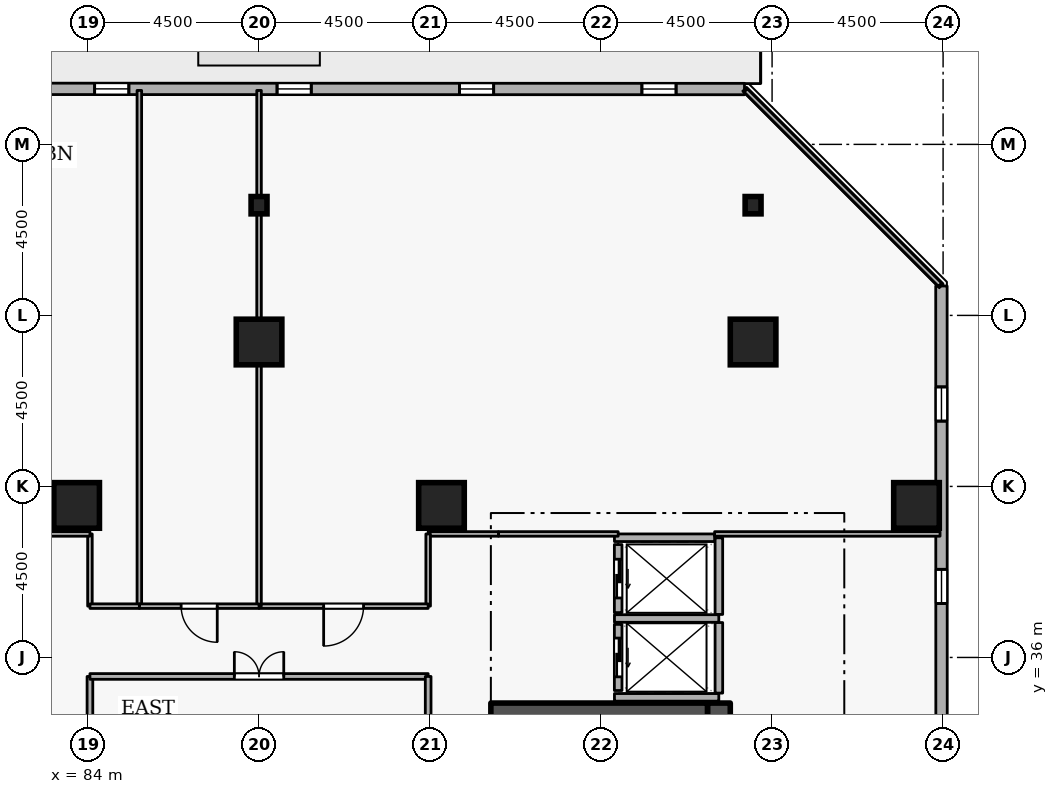
"""IFC4 building model, lengths in metres.
Left out: names, types, materials, properties, quantities, classifications, styles, units other than length and angle.
Written with IfcOpenShell. Run it as: python <this file> out.ifc"""

import sys

from ifc_helpers import new_model, si_unit, direction, frame, frame_2d, origin, origin_2d, place, context, subcontext, project, spatial, rectangle, i_section, extrude, element, fill, save


model = new_model("IFC4")
c1 = context("Model", 3, precision=1e-05, world=origin(), true_north=direction((0.0, 1.0)))
c2 = subcontext(c1, "Body", "Model", "MODEL_VIEW")
j1 = project(units=[si_unit("LENGTHUNIT", "METRE"), si_unit("PLANEANGLEUNIT", "RADIAN")], contexts=[c1])
p1 = place(None, origin())
s1 = spatial("IfcSite", under=j1, at=p1, CompositionType="ELEMENT")
p2 = place(p1, origin())
s2 = spatial("IfcBuilding", under=s1, at=p2, CompositionType="ELEMENT")
p3 = place(p2, frame((0.0, 0.0, 87.3)))
s3 = spatial("IfcBuildingStorey", under=s2, at=p3, CompositionType="ELEMENT", Elevation=87.3)
p4 = place(p3, frame((100.6, 19.2, 0.0), z_axis=(0.0, 0.0, 1.0), x_axis=(0.0, 1.0, 0.0)))
e1 = element("IfcWall", 1, at=p4, inside=s3, PredefinedType="SHEAR", context=c2, shape_type="SweptSolid", body=[
    extrude(rectangle(XDim=15.6, YDim=0.6, at=frame_2d((7.8, 0.0))), origin(), (0.0, 0.0, 1.0), 3.6),
])
p5 = place(p3, frame((94.6, 34.5, 0.0), z_axis=(0.0, 0.0, 1.0), x_axis=(1.0, 0.0, 0.0)))
e2 = element("IfcWall", 2, at=p5, inside=s3, PredefinedType="SHEAR", context=c2, shape_type="SweptSolid", body=[
    extrude(rectangle(XDim=5.7, YDim=0.6, at=frame_2d((2.85, 0.0))), origin(), (0.0, 0.0, 1.0), 3.6),
])
for number, where, z_axis, x_axis in (
    (3, (105.8, 40.0, 0.0), (0.0, 0.0, 1.0), (1.0, 0.0, 0.0)),
    (4, (101.5, 44.3, 0.0), (0.0, 0.0, 1.0), (1.0, 0.0, 0.0)),
    (5, (88.5, 44.3, 0.0), (0.0, 0.0, 1.0), (1.0, 0.0, 0.0)),
    (6, (93.3, 40.0, 0.0), (0.0, 0.0, 1.0), (1.0, 0.0, 0.0)),
    (7, (83.7, 40.0, 0.0), (0.0, 0.0, 1.0), (1.0, 0.0, 0.0)),
):
    element("IfcColumn", number, at=place(p3, frame(where, z_axis=z_axis, x_axis=x_axis)), inside=s3, PredefinedType="COLUMN", context=c2, shape_type="SweptSolid", body=[
        extrude(rectangle(XDim=1.2, YDim=1.2, at=origin_2d()), origin(), (0.0, 0.0, 1.0), 3.6),
    ])
for number, where, z_axis, x_axis in (
    (8, (101.5, 47.9, 0.0), (0.0, 0.0, 1.0), (1.0, 0.0, 0.0)),
    (9, (88.5, 47.9, 0.0), (0.0, 0.0, 1.0), (1.0, 0.0, 0.0)),
):
    element("IfcColumn", number, at=place(p3, frame(where, z_axis=z_axis, x_axis=x_axis)), inside=s3, PredefinedType="COLUMN", context=c2, shape_type="SweptSolid", body=[
        extrude(i_section(OverallWidth=0.418, OverallDepth=0.456, WebThickness=0.042, FlangeThickness=0.067, FilletRadius=0.015, at=origin_2d()), origin(), (0.0, 0.0, 1.0), 3.6),
    ])
p6 = place(p3, frame((106.465, 11.619, 0.0), z_axis=(0.0, 0.0, 1.0), x_axis=(-0.000243032466, 0.999999970468, 0.0)))
e10 = element("IfcWall", 10, at=p6, inside=s3, PredefinedType="STANDARD", context=c2, shape_type="SweptSolid", body=[
    extrude(rectangle(XDim=34.155, YDim=0.3, at=frame_2d((17.078, 0.0))), origin(), (0.0, 0.0, 1.0), 2.7),
])
p7 = place(p6, frame((6.6, 0.0, 0.72)))
e11 = element("IfcOpeningElement", 11, at=p7, cuts=e10, PredefinedType="OPENING", context=c2, shape_type="SweptSolid", body=[
    extrude(rectangle(XDim=0.9, YDim=1.75, at=frame_2d((0.45, 0.875))), frame((0.0, 0.16, 0.0), z_axis=(0.0, -1.0, 0.0), x_axis=(1.0, 0.0, 0.0)), (0.0, 0.0, 1.0), 0.32),
])
p8 = place(p6, frame((11.4, 0.0, 0.72)))
e12 = element("IfcOpeningElement", 12, at=p8, cuts=e10, PredefinedType="OPENING", context=c2, shape_type="SweptSolid", body=[
    extrude(rectangle(XDim=0.9, YDim=1.75, at=frame_2d((0.45, 0.875))), frame((0.0, 0.16, 0.0), z_axis=(0.0, -1.0, 0.0), x_axis=(1.0, 0.0, 0.0)), (0.0, 0.0, 1.0), 0.32),
])
p9 = place(p6, frame((21.0, 0.0, 0.72)))
e13 = element("IfcOpeningElement", 13, at=p9, cuts=e10, PredefinedType="OPENING", context=c2, shape_type="SweptSolid", body=[
    extrude(rectangle(XDim=0.9, YDim=1.75, at=frame_2d((0.45, 0.875))), frame((0.0, 0.16, 0.0), z_axis=(0.0, -1.0, 0.0), x_axis=(1.0, 0.0, 0.0)), (0.0, 0.0, 1.0), 0.32),
])
p10 = place(p6, frame((25.8, 0.0, 0.72)))
e14 = element("IfcOpeningElement", 14, at=p10, cuts=e10, PredefinedType="OPENING", context=c2, shape_type="SweptSolid", body=[
    extrude(rectangle(XDim=0.9, YDim=1.75, at=frame_2d((0.45, 0.875))), frame((0.0, 0.16, 0.0), z_axis=(0.0, -1.0, 0.0), x_axis=(1.0, 0.0, 0.0)), (0.0, 0.0, 1.0), 0.32),
])
p11 = place(p6, frame((30.6, 0.0, 0.72)))
e15 = element("IfcOpeningElement", 15, at=p11, cuts=e10, PredefinedType="OPENING", context=c2, shape_type="SweptSolid", body=[
    extrude(rectangle(XDim=0.9, YDim=1.75, at=frame_2d((0.45, 0.875))), frame((0.0, 0.16, 0.0), z_axis=(0.0, -1.0, 0.0), x_axis=(1.0, 0.0, 0.0)), (0.0, 0.0, 1.0), 0.32),
])
p12 = place(p3, frame((101.274, 50.956, 0.0), z_axis=(0.0, 0.0, 1.0), x_axis=(-0.999999970468, 0.000243032466, 0.0)))
e16 = element("IfcWall", 16, at=p12, inside=s3, PredefinedType="STANDARD", context=c2, shape_type="SweptSolid", body=[
    extrude(rectangle(XDim=34.155, YDim=0.3, at=frame_2d((17.078, 0.0))), origin(), (0.0, 0.0, 1.0), 2.7),
])
p13 = place(p12, frame((18.878, 0.0, 0.0)))
e17 = element("IfcOpeningElement", 17, at=p13, cuts=e16, PredefinedType="OPENING", context=c2, shape_type="SweptSolid", body=[
    extrude(rectangle(XDim=1.0, YDim=2.08, at=frame_2d((0.5, 1.04))), frame((0.0, 0.16, 0.0), z_axis=(0.0, -1.0, 0.0), x_axis=(1.0, 0.0, 0.0)), (0.0, 0.0, 1.0), 0.32),
])
p14 = place(p12, frame((1.8, 0.0, 0.72)))
e18 = element("IfcOpeningElement", 18, at=p14, cuts=e16, PredefinedType="OPENING", context=c2, shape_type="SweptSolid", body=[
    extrude(rectangle(XDim=0.9, YDim=1.75, at=frame_2d((0.45, 0.875))), frame((0.0, 0.16, 0.0), z_axis=(0.0, -1.0, 0.0), x_axis=(1.0, 0.0, 0.0)), (0.0, 0.0, 1.0), 0.32),
])
p15 = place(p12, frame((6.6, 0.0, 0.72)))
e19 = element("IfcOpeningElement", 19, at=p15, cuts=e16, PredefinedType="OPENING", context=c2, shape_type="SweptSolid", body=[
    extrude(rectangle(XDim=0.9, YDim=1.75, at=frame_2d((0.45, 0.875))), frame((0.0, 0.16, 0.0), z_axis=(0.0, -1.0, 0.0), x_axis=(1.0, 0.0, 0.0)), (0.0, 0.0, 1.0), 0.32),
])
p16 = place(p12, frame((11.4, 0.0, 0.72)))
e20 = element("IfcOpeningElement", 20, at=p16, cuts=e16, PredefinedType="OPENING", context=c2, shape_type="SweptSolid", body=[
    extrude(rectangle(XDim=0.9, YDim=1.75, at=frame_2d((0.45, 0.875))), frame((0.0, 0.16, 0.0), z_axis=(0.0, -1.0, 0.0), x_axis=(1.0, 0.0, 0.0)), (0.0, 0.0, 1.0), 0.32),
])
p17 = place(p12, frame((16.2, 0.0, 0.72)))
e21 = element("IfcOpeningElement", 21, at=p17, cuts=e16, PredefinedType="OPENING", context=c2, shape_type="SweptSolid", body=[
    extrude(rectangle(XDim=0.9, YDim=1.75, at=frame_2d((0.45, 0.875))), frame((0.0, 0.16, 0.0), z_axis=(0.0, -1.0, 0.0), x_axis=(1.0, 0.0, 0.0)), (0.0, 0.0, 1.0), 0.32),
])
p18 = place(p12, frame((21.0, 0.0, 0.72)))
e22 = element("IfcOpeningElement", 22, at=p18, cuts=e16, PredefinedType="OPENING", context=c2, shape_type="SweptSolid", body=[
    extrude(rectangle(XDim=0.9, YDim=1.75, at=frame_2d((0.45, 0.875))), frame((0.0, 0.16, 0.0), z_axis=(0.0, -1.0, 0.0), x_axis=(1.0, 0.0, 0.0)), (0.0, 0.0, 1.0), 0.32),
])
p19 = place(p12, frame((25.8, 0.0, 0.72)))
e23 = element("IfcOpeningElement", 23, at=p19, cuts=e16, PredefinedType="OPENING", context=c2, shape_type="SweptSolid", body=[
    extrude(rectangle(XDim=0.9, YDim=1.75, at=frame_2d((0.45, 0.875))), frame((0.0, 0.16, 0.0), z_axis=(0.0, -1.0, 0.0), x_axis=(1.0, 0.0, 0.0)), (0.0, 0.0, 1.0), 0.32),
])
p20 = place(p12, frame((30.6, 0.0, 0.72)))
e24 = element("IfcOpeningElement", 24, at=p20, cuts=e16, PredefinedType="OPENING", context=c2, shape_type="SweptSolid", body=[
    extrude(rectangle(XDim=0.9, YDim=1.75, at=frame_2d((0.45, 0.875))), frame((0.0, 0.16, 0.0), z_axis=(0.0, -1.0, 0.0), x_axis=(1.0, 0.0, 0.0)), (0.0, 0.0, 1.0), 0.32),
])
p21 = place(p3, frame((97.95, 36.87, 0.0), z_axis=(0.0, 0.0, 1.0), x_axis=(0.0, -1.0, 0.0)))
e25 = element("IfcWall", 25, at=p21, inside=s3, PredefinedType="STANDARD", context=c2, shape_type="SweptSolid", body=[
    extrude(rectangle(XDim=1.74, YDim=0.2, at=frame_2d((0.87, 0.0))), origin(), (0.0, 0.0, 1.0), 3.34),
])
p22 = place(p21, frame((0.36, 0.0, 0.0)))
e26 = element("IfcOpeningElement", 26, at=p22, cuts=e25, PredefinedType="OPENING", context=c2, shape_type="SweptSolid", body=[
    extrude(rectangle(XDim=1.02, YDim=2.06, at=frame_2d((0.51, 1.03))), frame((0.0, 0.11, 0.0), z_axis=(0.0, -1.0, 0.0), x_axis=(1.0, 0.0, 0.0)), (0.0, 0.0, 1.0), 0.22),
])
p23 = place(p3, frame((97.95, 38.97, 0.0), z_axis=(0.0, 0.0, 1.0), x_axis=(0.0, -1.0, 0.0)))
e27 = element("IfcWall", 27, at=p23, inside=s3, PredefinedType="STANDARD", context=c2, shape_type="SweptSolid", body=[
    extrude(rectangle(XDim=1.79, YDim=0.2, at=frame_2d((0.895, 0.0))), origin(), (0.0, 0.0, 1.0), 3.34),
])
p24 = place(p23, frame((0.385, 0.0, 0.0)))
e28 = element("IfcOpeningElement", 28, at=p24, cuts=e27, PredefinedType="OPENING", context=c2, shape_type="SweptSolid", body=[
    extrude(rectangle(XDim=1.02, YDim=2.06, at=frame_2d((0.51, 1.03))), frame((0.0, 0.11, 0.0), z_axis=(0.0, -1.0, 0.0), x_axis=(1.0, 0.0, 0.0)), (0.0, 0.0, 1.0), 0.22),
])
for number, where, z_axis, x_axis in (
    (29, (97.852, 37.025, 0.0), (0.0, 0.0, 1.0), (1.0, 0.0, 0.0)),
    (30, (97.852, 34.95, 0.0), (0.0, 0.0, 1.0), (1.0, 0.0, 0.0)),
):
    element("IfcWall", number, at=place(p3, frame(where, z_axis=z_axis, x_axis=x_axis)), inside=s3, PredefinedType="STANDARD", context=c2, shape_type="SweptSolid", body=[
        extrude(rectangle(XDim=2.746, YDim=0.2, at=frame_2d((1.373, 0.0))), origin(), (0.0, 0.0, 1.0), 3.34),
    ])
p25 = place(p3, frame((100.6, 35.062, 0.0), z_axis=(0.0, 0.0, 1.0), x_axis=(0.0, 1.0, 0.0)))
e31 = element("IfcWall", 31, at=p25, inside=s3, PredefinedType="STANDARD", context=c2, shape_type="SweptSolid", body=[
    extrude(rectangle(XDim=1.856, YDim=0.2, at=frame_2d((0.928, 0.0))), origin(), (0.0, 0.0, 1.0), 3.34),
])
p26 = place(p3, frame((100.6, 37.132, 0.0), z_axis=(0.0, 0.0, 1.0), x_axis=(0.0, 1.0, 0.0)))
e32 = element("IfcWall", 32, at=p26, inside=s3, PredefinedType="STANDARD", context=c2, shape_type="SweptSolid", body=[
    extrude(rectangle(XDim=2.016, YDim=0.2, at=frame_2d((1.008, 0.0))), origin(), (0.0, 0.0, 1.0), 3.34),
])
p27 = place(p3, frame((97.852, 39.15, 0.0), z_axis=(0.0, 0.0, 1.0), x_axis=(1.0, 0.0, 0.0)))
e33 = element("IfcWall", 33, at=p27, inside=s3, PredefinedType="STANDARD", context=c2, shape_type="SweptSolid", body=[
    extrude(rectangle(XDim=2.636, YDim=0.2, at=frame_2d((1.318, 0.0))), origin(), (0.0, 0.0, 1.0), 3.34),
])
p28 = place(p3, frame((106.42, 39.25, 0.0), z_axis=(0.0, 0.0, 1.0), x_axis=(-1.0, 0.0, 0.0)))
e34 = element("IfcWall", 34, at=p28, inside=s3, PredefinedType="PARTITIONING", context=c2, shape_type="SweptSolid", body=[
    extrude(rectangle(XDim=5.932, YDim=0.12, at=frame_2d((2.966, 0.0))), origin(), (0.0, 0.0, 1.0), 3.34),
])
p29 = place(p3, frame((97.95, 39.25, 0.0), z_axis=(0.0, 0.0, 1.0), x_axis=(-1.0, 0.0, 0.0)))
e35 = element("IfcWall", 35, at=p29, inside=s3, PredefinedType="PARTITIONING", context=c2, shape_type="SweptSolid", body=[
    extrude(rectangle(XDim=3.15, YDim=0.12, at=frame_2d((1.575, 0.0))), origin(), (0.0, 0.0, 1.0), 3.34),
])
p30 = place(p3, frame((94.8, 39.25, 0.0), z_axis=(0.0, 0.0, 1.0), x_axis=(-1.0, 0.0, 0.0)))
e36 = element("IfcWall", 36, at=p30, inside=s3, PredefinedType="PARTITIONING", context=c2, shape_type="SweptSolid", body=[
    extrude(rectangle(XDim=1.85, YDim=0.12, at=frame_2d((0.925, 0.0))), origin(), (0.0, 0.0, 1.0), 3.34),
])
p31 = place(p3, frame((92.95, 39.25, 0.0), z_axis=(0.0, 0.0, 1.0), x_axis=(0.0, -1.0, 0.0)))
e37 = element("IfcWall", 37, at=p31, inside=s3, PredefinedType="PARTITIONING", context=c2, shape_type="SweptSolid", body=[
    extrude(rectangle(XDim=1.9, YDim=0.12, at=frame_2d((0.95, 0.0))), origin(), (0.0, 0.0, 1.0), 3.34),
])
p32 = place(p3, frame((92.95, 37.35, 0.0), z_axis=(0.0, 0.0, 1.0), x_axis=(-1.0, 0.0, 0.0)))
e38 = element("IfcWall", 38, at=p32, inside=s3, PredefinedType="PARTITIONING", context=c2, shape_type="SweptSolid", body=[
    extrude(rectangle(XDim=4.45, YDim=0.12, at=frame_2d((2.225, 0.0))), origin(), (0.0, 0.0, 1.0), 3.34),
])
p33 = place(p32, frame((1.7, 0.0, 0.0)))
e39 = element("IfcOpeningElement", 39, at=p33, cuts=e38, PredefinedType="OPENING", context=c2, shape_type="SweptSolid", body=[
    extrude(rectangle(XDim=1.05, YDim=2.1, at=frame_2d((0.525, 1.05))), frame((0.0, 0.07, 0.0), z_axis=(0.0, -1.0, 0.0), x_axis=(1.0, 0.0, 0.0)), (0.0, 0.0, 1.0), 0.14),
])
p34 = place(p3, frame((88.5, 37.35, 0.0), z_axis=(0.0, 0.0, 1.0), x_axis=(0.0, 1.0, 0.0)))
e40 = element("IfcWall", 40, at=p34, inside=s3, PredefinedType="PARTITIONING", context=c2, shape_type="SweptSolid", body=[
    extrude(rectangle(XDim=13.57, YDim=0.12, at=frame_2d((6.785, 0.0))), origin(), (0.0, 0.0, 1.0), 2.932),
])
p35 = place(p3, frame((101.307, 50.92, 0.0), z_axis=(0.0, 0.0, 1.0), x_axis=(0.707106781187, -0.707106781187, 0.0)))
e41 = element("IfcWall", 41, at=p35, inside=s3, PredefinedType="PARTITIONING", context=c2, shape_type="SweptSolid", body=[
    extrude(rectangle(XDim=7.23, YDim=0.12, at=frame_2d((3.615, 0.0))), origin(), (0.0, 0.0, 1.0), 3.34),
])
p36 = place(p3, frame((85.35, 37.35, 0.0), z_axis=(0.0, 0.0, 1.0), x_axis=(0.0, 1.0, 0.0)))
e42 = element("IfcWall", 42, at=p36, inside=s3, PredefinedType="PARTITIONING", context=c2, shape_type="SweptSolid", body=[
    extrude(rectangle(XDim=13.57, YDim=0.12, at=frame_2d((6.785, 0.0))), origin(), (0.0, 0.0, 1.0), 3.34),
])
p37 = place(p3, frame((88.5, 37.35, 0.0), z_axis=(0.0, 0.0, 1.0), x_axis=(-1.0, 0.0, 0.0)))
e43 = element("IfcWall", 43, at=p37, inside=s3, PredefinedType="PARTITIONING", context=c2, shape_type="SweptSolid", body=[
    extrude(rectangle(XDim=3.15, YDim=0.12, at=frame_2d((1.575, 0.0))), origin(), (0.0, 0.0, 1.0), 3.34),
])
p38 = place(p37, frame((1.1, 0.0, 0.0)))
e44 = element("IfcOpeningElement", 44, at=p38, cuts=e43, PredefinedType="OPENING", context=c2, shape_type="SweptSolid", body=[
    extrude(rectangle(XDim=0.95, YDim=2.1, at=frame_2d((0.475, 1.05))), frame((0.0, 0.07, 0.0), z_axis=(0.0, -1.0, 0.0), x_axis=(1.0, 0.0, 0.0)), (0.0, 0.0, 1.0), 0.14),
])
p39 = place(p3, frame((84.05, 37.35, 0.0), z_axis=(0.0, 0.0, 1.0), x_axis=(0.0, 1.0, 0.0)))
e45 = element("IfcWall", 45, at=p39, inside=s3, PredefinedType="PARTITIONING", context=c2, shape_type="SweptSolid", body=[
    extrude(rectangle(XDim=1.9, YDim=0.12, at=frame_2d((0.95, 0.0))), origin(), (0.0, 0.0, 1.0), 3.34),
])
p40 = place(p3, frame((84.05, 39.25, 0.0), z_axis=(0.0, 0.0, 1.0), x_axis=(-1.0, 0.0, 0.0)))
e46 = element("IfcWall", 46, at=p40, inside=s3, PredefinedType="PARTITIONING", context=c2, shape_type="SweptSolid", body=[
    extrude(rectangle(XDim=1.85, YDim=0.12, at=frame_2d((0.925, 0.0))), origin(), (0.0, 0.0, 1.0), 3.34),
])
p41 = place(p3, frame((85.35, 37.35, 0.0), z_axis=(0.0, 0.0, 1.0), x_axis=(-1.0, 0.0, 0.0)))
e47 = element("IfcWall", 47, at=p41, inside=s3, PredefinedType="PARTITIONING", context=c2, shape_type="SweptSolid", body=[
    extrude(rectangle(XDim=1.3, YDim=0.12, at=frame_2d((0.65, 0.0))), origin(), (0.0, 0.0, 1.0), 3.34),
])
p42 = place(p3, frame((84.05, 32.2, 0.0), z_axis=(0.0, 0.0, 1.0), x_axis=(0.0, 1.0, 0.0)))
e48 = element("IfcWall", 48, at=p42, inside=s3, PredefinedType="PARTITIONING", context=c2, shape_type="SweptSolid", body=[
    extrude(rectangle(XDim=3.3, YDim=0.15, at=frame_2d((1.65, 0.0))), origin(), (0.0, 0.0, 1.0), 3.34),
])
p43 = place(p3, frame((84.05, 35.5, 0.0), z_axis=(0.0, 0.0, 1.0), x_axis=(1.0, 0.0, 0.0)))
e49 = element("IfcWall", 49, at=p43, inside=s3, PredefinedType="PARTITIONING", context=c2, shape_type="SweptSolid", body=[
    extrude(rectangle(XDim=8.9, YDim=0.15, at=frame_2d((4.45, 0.0))), origin(), (0.0, 0.0, 1.0), 3.34),
])
p44 = place(p43, frame((3.8, 0.0, 0.0)))
e50 = element("IfcOpeningElement", 50, at=p44, cuts=e49, PredefinedType="OPENING", context=c2, shape_type="SweptSolid", body=[
    extrude(rectangle(XDim=1.3, YDim=2.12, at=frame_2d((0.65, 1.06))), frame((0.0, 0.085, 0.0), z_axis=(0.0, -1.0, 0.0), x_axis=(1.0, 0.0, 0.0)), (0.0, 0.0, 1.0), 0.17),
])
p45 = place(p3, frame((92.95, 35.5, 0.0), z_axis=(0.0, 0.0, 1.0), x_axis=(0.0, -1.0, 0.0)))
e51 = element("IfcWall", 51, at=p45, inside=s3, PredefinedType="PARTITIONING", context=c2, shape_type="SweptSolid", body=[
    extrude(rectangle(XDim=3.3, YDim=0.15, at=frame_2d((1.65, 0.0))), origin(), (0.0, 0.0, 1.0), 3.34),
])
p46 = place(p10, origin())
e52 = element("IfcWindow", 52, at=p46, inside=s3, PartitioningType="SINGLE_PANEL", PredefinedType="WINDOW", context=c2, shape_type="SweptSolid", body=[
    extrude(rectangle(XDim=0.9, YDim=1.75, at=frame_2d((0.45, 0.875))), frame((0.0, 0.03, 0.0), z_axis=(0.0, -1.0, 0.0), x_axis=(1.0, 0.0, 0.0)), (0.0, 0.0, 1.0), 0.06),
])
fill(e14, e52)
p47 = place(p11, origin())
e53 = element("IfcWindow", 53, at=p47, inside=s3, PartitioningType="SINGLE_PANEL", PredefinedType="WINDOW", context=c2, shape_type="SweptSolid", body=[
    extrude(rectangle(XDim=0.9, YDim=1.75, at=frame_2d((0.45, 0.875))), frame((0.0, 0.03, 0.0), z_axis=(0.0, -1.0, 0.0), x_axis=(1.0, 0.0, 0.0)), (0.0, 0.0, 1.0), 0.06),
])
fill(e15, e53)
p48 = place(p14, origin())
e54 = element("IfcWindow", 54, at=p48, inside=s3, PartitioningType="SINGLE_PANEL", PredefinedType="WINDOW", context=c2, shape_type="SweptSolid", body=[
    extrude(rectangle(XDim=0.9, YDim=1.75, at=frame_2d((0.45, 0.875))), frame((0.0, 0.03, 0.0), z_axis=(0.0, -1.0, 0.0), x_axis=(1.0, 0.0, 0.0)), (0.0, 0.0, 1.0), 0.06),
])
fill(e18, e54)
p49 = place(p15, origin())
e55 = element("IfcWindow", 55, at=p49, inside=s3, PartitioningType="SINGLE_PANEL", PredefinedType="WINDOW", context=c2, shape_type="SweptSolid", body=[
    extrude(rectangle(XDim=0.9, YDim=1.75, at=frame_2d((0.45, 0.875))), frame((0.0, 0.03, 0.0), z_axis=(0.0, -1.0, 0.0), x_axis=(1.0, 0.0, 0.0)), (0.0, 0.0, 1.0), 0.06),
])
fill(e19, e55)
p50 = place(p16, origin())
e56 = element("IfcWindow", 56, at=p50, inside=s3, PartitioningType="SINGLE_PANEL", PredefinedType="WINDOW", context=c2, shape_type="SweptSolid", body=[
    extrude(rectangle(XDim=0.9, YDim=1.75, at=frame_2d((0.45, 0.875))), frame((0.0, 0.03, 0.0), z_axis=(0.0, -1.0, 0.0), x_axis=(1.0, 0.0, 0.0)), (0.0, 0.0, 1.0), 0.06),
])
fill(e20, e56)
p51 = place(p17, origin())
e57 = element("IfcWindow", 57, at=p51, inside=s3, PartitioningType="SINGLE_PANEL", PredefinedType="WINDOW", context=c2, shape_type="SweptSolid", body=[
    extrude(rectangle(XDim=0.9, YDim=1.75, at=frame_2d((0.45, 0.875))), frame((0.0, 0.03, 0.0), z_axis=(0.0, -1.0, 0.0), x_axis=(1.0, 0.0, 0.0)), (0.0, 0.0, 1.0), 0.06),
])
fill(e21, e57)
p52 = place(p22, origin())
e58 = element("IfcDoor", 58, at=p52, inside=s3, OperationType="SLIDING_TO_LEFT", PredefinedType="DOOR", context=c2, shape_type="SweptSolid", body=[
    extrude(rectangle(XDim=1.02, YDim=2.06, at=frame_2d((0.51, 1.03))), frame((0.0, 0.025, 0.0), z_axis=(0.0, -1.0, 0.0), x_axis=(1.0, 0.0, 0.0)), (0.0, 0.0, 1.0), 0.05),
])
fill(e26, e58)
p53 = place(p24, origin())
e59 = element("IfcDoor", 59, at=p53, inside=s3, OperationType="SLIDING_TO_LEFT", PredefinedType="DOOR", context=c2, shape_type="SweptSolid", body=[
    extrude(rectangle(XDim=1.02, YDim=2.06, at=frame_2d((0.51, 1.03))), frame((0.0, 0.025, 0.0), z_axis=(0.0, -1.0, 0.0), x_axis=(1.0, 0.0, 0.0)), (0.0, 0.0, 1.0), 0.05),
])
fill(e28, e59)
p54 = place(p33, origin())
e60 = element("IfcDoor", 60, at=p54, inside=s3, OperationType="SINGLE_SWING_RIGHT", PredefinedType="DOOR", context=c2, shape_type="SweptSolid", body=[
    extrude(rectangle(XDim=1.05, YDim=2.1, at=frame_2d((0.525, 1.05))), frame((0.0, 0.025, 0.0), z_axis=(0.0, -1.0, 0.0), x_axis=(1.0, 0.0, 0.0)), (0.0, 0.0, 1.0), 0.05),
])
fill(e39, e60)
p55 = place(p38, origin())
e61 = element("IfcDoor", 61, at=p55, inside=s3, OperationType="SINGLE_SWING_LEFT", PredefinedType="DOOR", context=c2, shape_type="SweptSolid", body=[
    extrude(rectangle(XDim=0.95, YDim=2.1, at=frame_2d((0.475, 1.05))), frame((0.0, 0.025, 0.0), z_axis=(0.0, -1.0, 0.0), x_axis=(1.0, 0.0, 0.0)), (0.0, 0.0, 1.0), 0.05),
])
fill(e44, e61)
p56 = place(p44, origin())
e62 = element("IfcDoor", 62, at=p56, inside=s3, OperationType="DOUBLE_DOOR_SINGLE_SWING", PredefinedType="DOOR", context=c2, shape_type="SweptSolid", body=[
    extrude(rectangle(XDim=1.3, YDim=2.12, at=frame_2d((0.65, 1.06))), frame((0.0, 0.025, 0.0), z_axis=(0.0, -1.0, 0.0), x_axis=(1.0, 0.0, 0.0)), (0.0, 0.0, 1.0), 0.05),
])
fill(e50, e62)
save(model, sys.argv[1])
